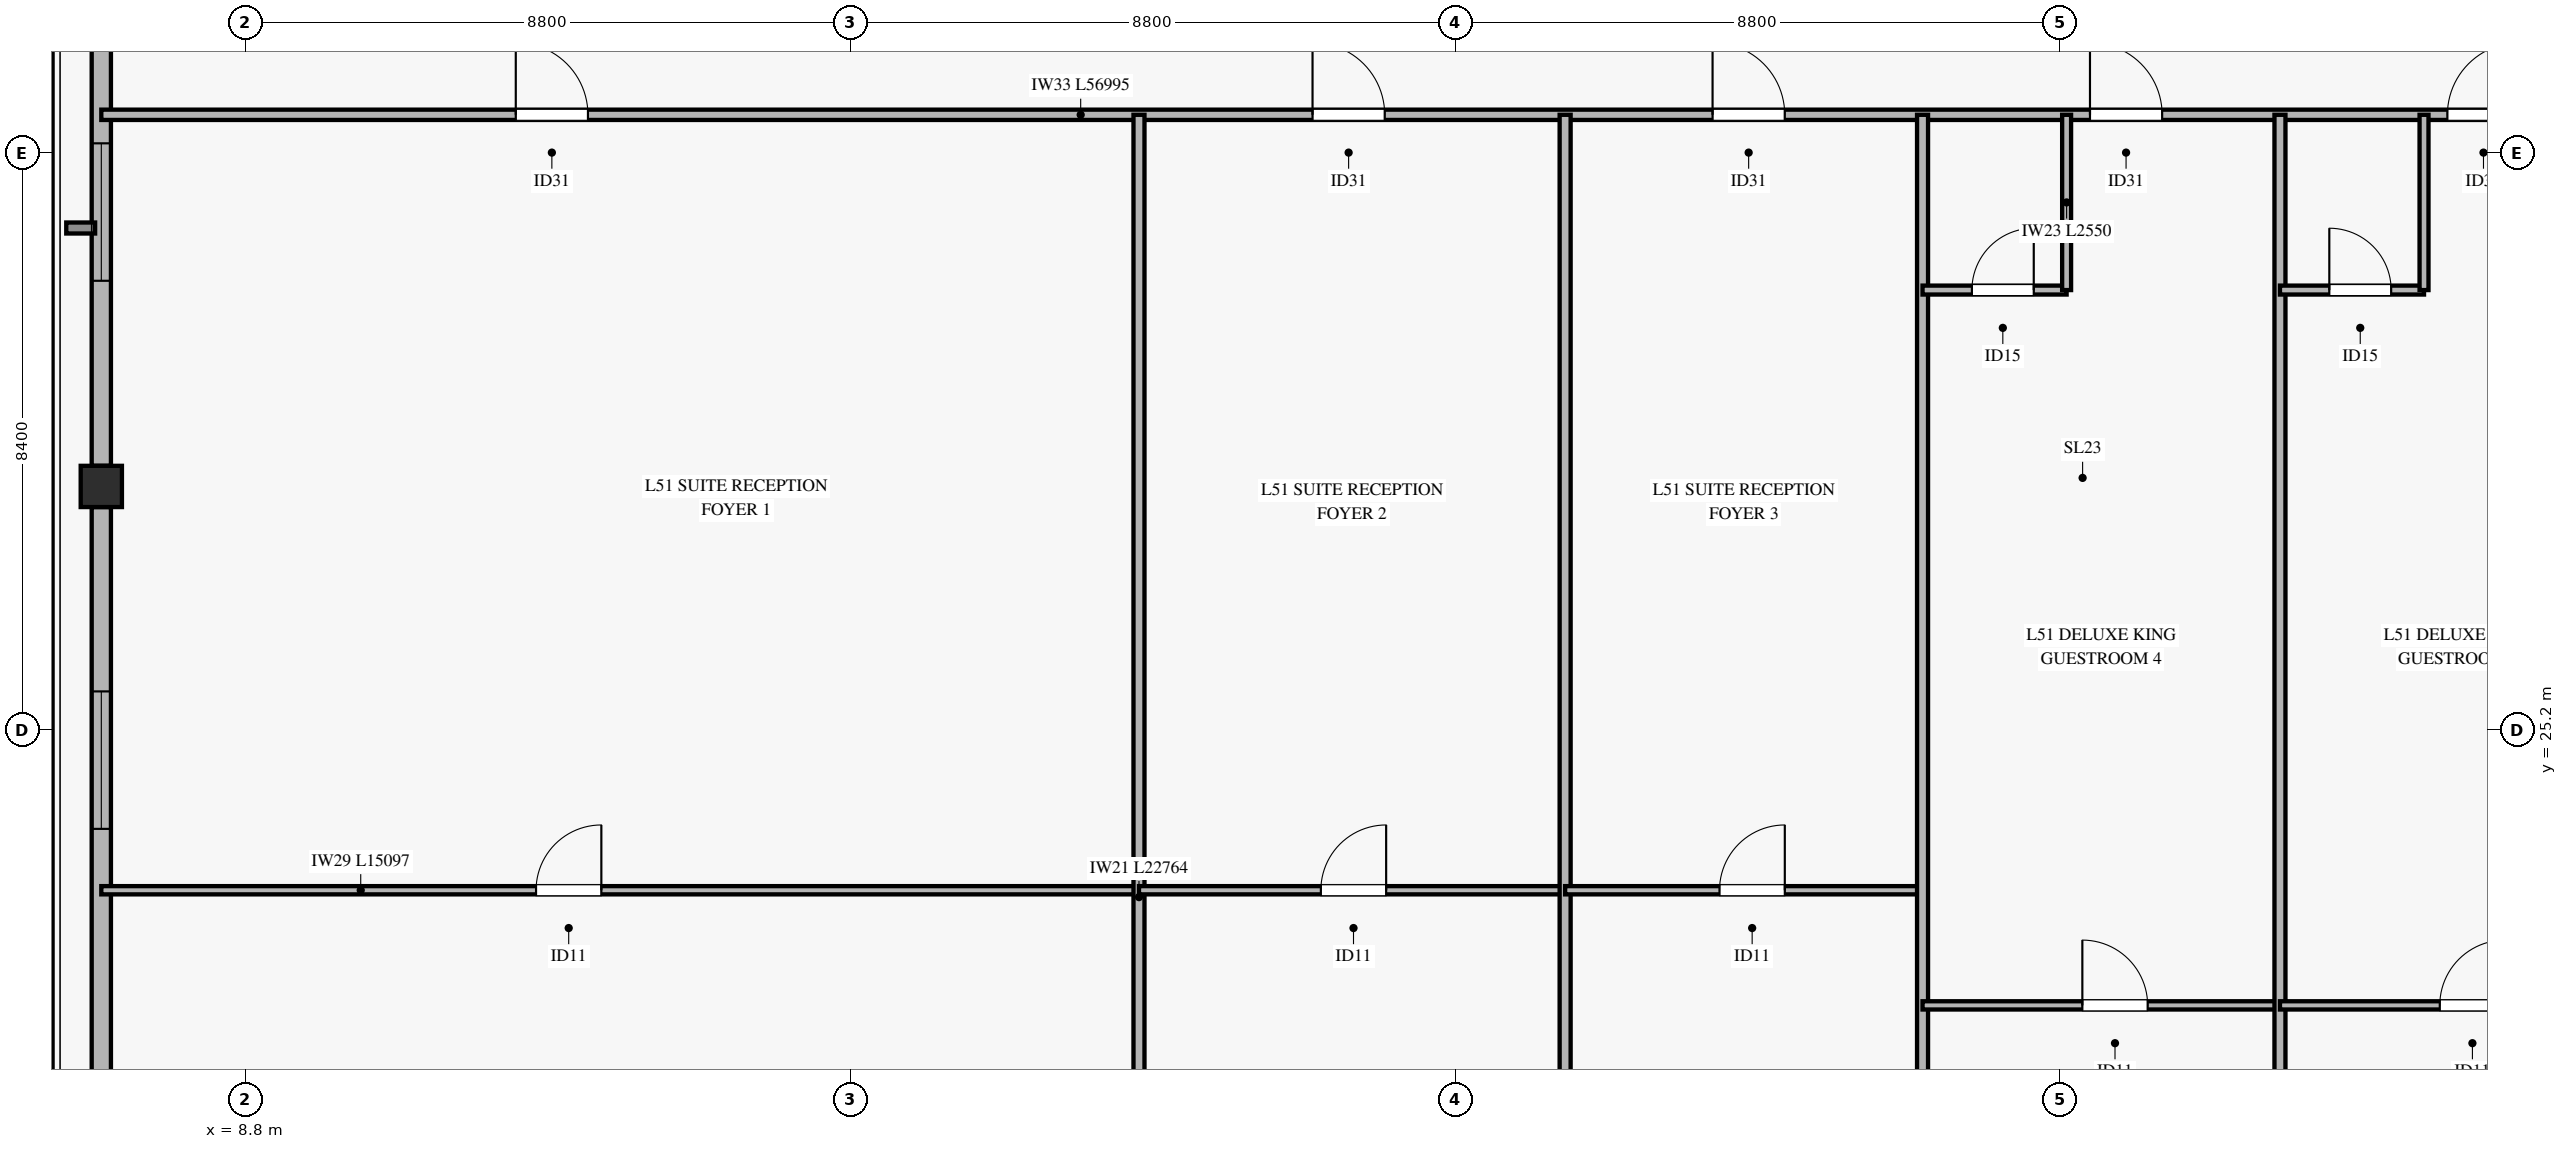
"""IFC4 building model, lengths in metres.
Left out: names, types, materials, properties, quantities, classifications, styles, units other than length and angle.
Written with IfcOpenShell. Run it as: python <this file> out.ifc"""

import sys

from ifc_helpers import new_model, si_unit, direction, frame, frame_2d, origin, origin_2d, place, context, subcontext, project, spatial, rectangle, hollow_rectangle, extrude, source, transform, mapped, element, fill, save


model = new_model("IFC4")
c1 = context("Model", 3, precision=1e-05, world=origin(), true_north=direction((0.0, 1.0)))
c2 = subcontext(c1, "Body", "Model", "MODEL_VIEW")
j1 = project(units=[si_unit("LENGTHUNIT", "METRE"), si_unit("PLANEANGLEUNIT", "RADIAN")], contexts=[c1])
p1 = place(None, origin())
s1 = spatial("IfcSite", under=j1, at=p1, CompositionType="ELEMENT")
p2 = place(p1, origin())
s2 = spatial("IfcBuilding", under=s1, at=p2, CompositionType="ELEMENT")
p3 = place(p2, frame((0.0, 0.0, 202.7)))
s3 = spatial("IfcBuildingStorey", under=s2, at=p3, CompositionType="ELEMENT", Elevation=202.7)
m1 = source(origin(), c2, "Body", "SweptSolid", [
    extrude(hollow_rectangle(XDim=0.6, YDim=0.6, WallThickness=0.028, at=origin_2d()), origin(), (0.0, 0.0, 1.0), 3.27),
])
p4 = place(p3, frame((6.703, 28.743, 0.0), z_axis=(0.0, 0.0, 1.0), x_axis=(1.0, 0.0, 0.0)))
e1 = element("IfcColumn", 1, at=p4, inside=s3, PredefinedType="COLUMN", context=c2, shape_type="MappedRepresentation", body=[
    mapped(m1, transform((0.0, 0.0, 0.0), x_axis=(1.0, 0.0, 0.0), y_axis=(0.0, 1.0, 0.0), z_axis=(0.0, 0.0, 1.0), scale=1.0)),
])
p5 = place(p3, frame((6.703, 14.186, 0.0), z_axis=(0.0, 0.0, 1.0), x_axis=(0.0, 1.0, 0.0)))
e2 = element("IfcWall", 2, at=p5, inside=s3, PredefinedType="SOLIDWALL", context=c2, shape_type="SweptSolid", body=[
    extrude(rectangle(XDim=14.257, YDim=0.28, at=frame_2d((7.128, 0.0))), origin(), (0.0, 0.0, 1.0), 2.75),
])
p6 = place(p5, frame((2.947, 0.0, 0.45)))
e3 = element("IfcOpeningElement", 3, at=p6, cuts=e2, PredefinedType="OPENING", context=c2, shape_type="SweptSolid", body=[
    extrude(rectangle(XDim=2.0, YDim=2.0, at=frame_2d((1.0, 1.0))), frame((0.0, 0.15, 0.0), z_axis=(0.0, -1.0, 0.0), x_axis=(1.0, 0.0, 0.0)), (0.0, 0.0, 1.0), 0.3),
])
p7 = place(p5, frame((9.575, 0.0, 0.45)))
e4 = element("IfcOpeningElement", 4, at=p7, cuts=e2, PredefinedType="OPENING", context=c2, shape_type="SweptSolid", body=[
    extrude(rectangle(XDim=2.0, YDim=2.0, at=frame_2d((1.0, 1.0))), frame((0.0, 0.15, 0.0), z_axis=(0.0, -1.0, 0.0), x_axis=(1.0, 0.0, 0.0)), (0.0, 0.0, 1.0), 0.3),
])
p8 = place(p3, frame((6.703, 29.043, 0.0), z_axis=(0.0, 0.0, 1.0), x_axis=(0.0, 1.0, 0.0)))
e5 = element("IfcWall", 5, at=p8, inside=s3, PredefinedType="SOLIDWALL", context=c2, shape_type="SweptSolid", body=[
    extrude(rectangle(XDim=14.257, YDim=0.28, at=frame_2d((7.128, 0.0))), origin(), (0.0, 0.0, 1.0), 2.75),
])
p9 = place(p8, frame((2.692, 0.0, 0.45)))
e6 = element("IfcOpeningElement", 6, at=p9, cuts=e5, PredefinedType="OPENING", context=c2, shape_type="SweptSolid", body=[
    extrude(rectangle(XDim=2.0, YDim=2.0, at=frame_2d((1.0, 1.0))), frame((0.0, 0.15, 0.0), z_axis=(0.0, -1.0, 0.0), x_axis=(1.0, 0.0, 0.0)), (0.0, 0.0, 1.0), 0.3),
])
p10 = place(p3, frame((6.703, 34.15, 0.0), z_axis=(0.0, 0.0, 1.0), x_axis=(1.0, 0.0, 0.0)))
e7 = element("IfcWall", 7, at=p10, inside=s3, PredefinedType="PARTITIONING", context=c2, shape_type="SweptSolid", body=[
    extrude(rectangle(XDim=56.995, YDim=0.15, at=frame_2d((28.498, 0.0))), origin(), (0.0, 0.0, 1.0), 2.455),
])
p11 = place(p10, frame((6.03, 0.0, 0.0)))
e8 = element("IfcOpeningElement", 8, at=p11, cuts=e7, PredefinedType="OPENING", context=c2, shape_type="SweptSolid", body=[
    extrude(rectangle(XDim=1.05, YDim=2.15, at=frame_2d((0.525, 1.075))), frame((0.0, 0.085, 0.0), z_axis=(0.0, -1.0, 0.0), x_axis=(1.0, 0.0, 0.0)), (0.0, 0.0, 1.0), 0.17),
])
p12 = place(p10, frame((17.622, 0.0, 0.0)))
e9 = element("IfcOpeningElement", 9, at=p12, cuts=e7, PredefinedType="OPENING", context=c2, shape_type="SweptSolid", body=[
    extrude(rectangle(XDim=1.05, YDim=2.15, at=frame_2d((0.525, 1.075))), frame((0.0, 0.085, 0.0), z_axis=(0.0, -1.0, 0.0), x_axis=(1.0, 0.0, 0.0)), (0.0, 0.0, 1.0), 0.17),
])
p13 = place(p10, frame((23.442, 0.0, 0.0)))
e10 = element("IfcOpeningElement", 10, at=p13, cuts=e7, PredefinedType="OPENING", context=c2, shape_type="SweptSolid", body=[
    extrude(rectangle(XDim=1.05, YDim=2.15, at=frame_2d((0.525, 1.075))), frame((0.0, 0.085, 0.0), z_axis=(0.0, -1.0, 0.0), x_axis=(1.0, 0.0, 0.0)), (0.0, 0.0, 1.0), 0.17),
])
p14 = place(p10, frame((28.933, 0.0, 0.0)))
e11 = element("IfcOpeningElement", 11, at=p14, cuts=e7, PredefinedType="OPENING", context=c2, shape_type="SweptSolid", body=[
    extrude(rectangle(XDim=1.05, YDim=2.15, at=frame_2d((0.525, 1.075))), frame((0.0, 0.085, 0.0), z_axis=(0.0, -1.0, 0.0), x_axis=(1.0, 0.0, 0.0)), (0.0, 0.0, 1.0), 0.17),
])
p15 = place(p10, frame((34.133, 0.0, 0.0)))
e12 = element("IfcOpeningElement", 12, at=p15, cuts=e7, PredefinedType="OPENING", context=c2, shape_type="SweptSolid", body=[
    extrude(rectangle(XDim=1.05, YDim=2.15, at=frame_2d((0.525, 1.075))), frame((0.0, 0.085, 0.0), z_axis=(0.0, -1.0, 0.0), x_axis=(1.0, 0.0, 0.0)), (0.0, 0.0, 1.0), 0.17),
])
p16 = place(p10, frame((44.627, 0.0, 0.0)))
e13 = element("IfcOpeningElement", 13, at=p16, cuts=e7, PredefinedType="OPENING", context=c2, shape_type="SweptSolid", body=[
    extrude(rectangle(XDim=1.05, YDim=2.15, at=frame_2d((0.525, 1.075))), frame((0.0, 0.085, 0.0), z_axis=(0.0, -1.0, 0.0), x_axis=(1.0, 0.0, 0.0)), (0.0, 0.0, 1.0), 0.17),
])
p17 = place(p3, frame((6.703, 22.868, 0.0), z_axis=(0.0, 0.0, 1.0), x_axis=(1.0, 0.0, 0.0)))
e14 = element("IfcWall", 14, at=p17, inside=s3, PredefinedType="PARTITIONING", context=c2, shape_type="SweptSolid", body=[
    extrude(rectangle(XDim=15.097, YDim=0.12, at=frame_2d((7.549, 0.0))), origin(), (0.0, 0.0, 1.0), 2.455),
])
p18 = place(p17, frame((6.325, 0.0, 0.0)))
e15 = element("IfcOpeningElement", 15, at=p18, cuts=e14, PredefinedType="OPENING", context=c2, shape_type="SweptSolid", body=[
    extrude(rectangle(XDim=0.95, YDim=2.1, at=frame_2d((0.475, 1.05))), frame((0.0, 0.07, 0.0), z_axis=(0.0, -1.0, 0.0), x_axis=(1.0, 0.0, 0.0)), (0.0, 0.0, 1.0), 0.14),
])
p19 = place(p3, frame((21.8, 11.386, 0.0), z_axis=(0.0, 0.0, 1.0), x_axis=(0.0, 1.0, 0.0)))
e16 = element("IfcWall", 16, at=p19, inside=s3, PredefinedType="PARTITIONING", context=c2, shape_type="SweptSolid", body=[
    extrude(rectangle(XDim=22.764, YDim=0.16, at=frame_2d((11.382, 0.0))), origin(), (0.0, 0.0, 1.0), 2.755),
])
p20 = place(p3, frame((21.8, 22.868, 0.0), z_axis=(0.0, 0.0, 1.0), x_axis=(1.0, 0.0, 0.0)))
e17 = element("IfcWall", 17, at=p20, inside=s3, PredefinedType="PARTITIONING", context=c2, shape_type="SweptSolid", body=[
    extrude(rectangle(XDim=6.2, YDim=0.12, at=frame_2d((3.1, 0.0))), origin(), (0.0, 0.0, 1.0), 3.27),
])
p21 = place(p20, frame((2.646, 0.0, 0.0)))
e18 = element("IfcOpeningElement", 18, at=p21, cuts=e17, PredefinedType="OPENING", context=c2, shape_type="SweptSolid", body=[
    extrude(rectangle(XDim=0.95, YDim=2.1, at=frame_2d((0.475, 1.05))), frame((0.0, 0.07, 0.0), z_axis=(0.0, -1.0, 0.0), x_axis=(1.0, 0.0, 0.0)), (0.0, 0.0, 1.0), 0.14),
])
p22 = place(p3, frame((28.0, 11.386, 0.0), z_axis=(0.0, 0.0, 1.0), x_axis=(0.0, 1.0, 0.0)))
e19 = element("IfcWall", 19, at=p22, inside=s3, PredefinedType="PARTITIONING", context=c2, shape_type="SweptSolid", body=[
    extrude(rectangle(XDim=22.764, YDim=0.16, at=frame_2d((11.382, 0.0))), origin(), (0.0, 0.0, 1.0), 2.755),
])
p23 = place(p3, frame((28.0, 22.868, 0.0), z_axis=(0.0, 0.0, 1.0), x_axis=(1.0, 0.0, 0.0)))
e20 = element("IfcWall", 20, at=p23, inside=s3, PredefinedType="PARTITIONING", context=c2, shape_type="SweptSolid", body=[
    extrude(rectangle(XDim=5.2, YDim=0.12, at=frame_2d((2.6, 0.0))), origin(), (0.0, 0.0, 1.0), 2.455),
])
p24 = place(p23, frame((2.246, 0.0, 0.0)))
e21 = element("IfcOpeningElement", 21, at=p24, cuts=e20, PredefinedType="OPENING", context=c2, shape_type="SweptSolid", body=[
    extrude(rectangle(XDim=0.95, YDim=2.1, at=frame_2d((0.475, 1.05))), frame((0.0, 0.07, 0.0), z_axis=(0.0, -1.0, 0.0), x_axis=(1.0, 0.0, 0.0)), (0.0, 0.0, 1.0), 0.14),
])
p25 = place(p3, frame((33.2, 11.386, 0.0), z_axis=(0.0, 0.0, 1.0), x_axis=(0.0, 1.0, 0.0)))
e22 = element("IfcWall", 22, at=p25, inside=s3, PredefinedType="PARTITIONING", context=c2, shape_type="SweptSolid", body=[
    extrude(rectangle(XDim=22.764, YDim=0.16, at=frame_2d((11.382, 0.0))), origin(), (0.0, 0.0, 1.0), 2.755),
])
p26 = place(p3, frame((33.2, 31.6, 0.0), z_axis=(0.0, 0.0, 1.0), x_axis=(1.0, 0.0, 0.0)))
e23 = element("IfcWall", 23, at=p26, inside=s3, PredefinedType="PARTITIONING", context=c2, shape_type="SweptSolid", body=[
    extrude(rectangle(XDim=2.096, YDim=0.13, at=frame_2d((1.048, 0.0))), origin(), (0.0, 0.0, 1.0), 3.27),
])
p27 = place(p26, frame((0.718, 0.0, 0.0)))
e24 = element("IfcOpeningElement", 24, at=p27, cuts=e23, PredefinedType="OPENING", context=c2, shape_type="SweptSolid", body=[
    extrude(rectangle(XDim=0.9, YDim=2.1, at=frame_2d((0.45, 1.05))), frame((0.0, 0.075, 0.0), z_axis=(0.0, -1.0, 0.0), x_axis=(1.0, 0.0, 0.0)), (0.0, 0.0, 1.0), 0.15),
])
p28 = place(p3, frame((35.296, 31.6, 0.0), z_axis=(0.0, 0.0, 1.0), x_axis=(0.0, 1.0, 0.0)))
e25 = element("IfcWall", 25, at=p28, inside=s3, PredefinedType="PARTITIONING", context=c2, shape_type="SweptSolid", body=[
    extrude(rectangle(XDim=2.55, YDim=0.13, at=frame_2d((1.275, 0.0))), origin(), (0.0, 0.0, 1.0), 2.855),
])
p29 = place(p3, frame((33.2, 21.193, 0.0), z_axis=(0.0, 0.0, 1.0), x_axis=(1.0, 0.0, 0.0)))
e26 = element("IfcWall", 26, at=p29, inside=s3, PredefinedType="PARTITIONING", context=c2, shape_type="SweptSolid", body=[
    extrude(rectangle(XDim=5.2, YDim=0.12, at=frame_2d((2.6, 0.0))), origin(), (0.0, 0.0, 1.0), 2.455),
])
p30 = place(p29, frame((2.325, 0.0, 0.0)))
e27 = element("IfcOpeningElement", 27, at=p30, cuts=e26, PredefinedType="OPENING", context=c2, shape_type="SweptSolid", body=[
    extrude(rectangle(XDim=0.95, YDim=2.1, at=frame_2d((0.475, 1.05))), frame((0.0, 0.07, 0.0), z_axis=(0.0, -1.0, 0.0), x_axis=(1.0, 0.0, 0.0)), (0.0, 0.0, 1.0), 0.14),
])
p31 = place(p3, frame((38.4, 11.386, 0.0), z_axis=(0.0, 0.0, 1.0), x_axis=(0.0, 1.0, 0.0)))
e28 = element("IfcWall", 28, at=p31, inside=s3, PredefinedType="PARTITIONING", context=c2, shape_type="SweptSolid", body=[
    extrude(rectangle(XDim=22.764, YDim=0.16, at=frame_2d((11.382, 0.0))), origin(), (0.0, 0.0, 1.0), 2.755),
])
p32 = place(p3, frame((38.4, 31.6, 0.0), z_axis=(0.0, 0.0, 1.0), x_axis=(1.0, 0.0, 0.0)))
e29 = element("IfcWall", 29, at=p32, inside=s3, PredefinedType="PARTITIONING", context=c2, shape_type="SweptSolid", body=[
    extrude(rectangle(XDim=2.096, YDim=0.13, at=frame_2d((1.048, 0.0))), origin(), (0.0, 0.0, 1.0), 3.27),
])
p33 = place(p32, frame((0.718, 0.0, 0.0)))
e30 = element("IfcOpeningElement", 30, at=p33, cuts=e29, PredefinedType="OPENING", context=c2, shape_type="SweptSolid", body=[
    extrude(rectangle(XDim=0.9, YDim=2.1, at=frame_2d((0.45, 1.05))), frame((0.0, 0.075, 0.0), z_axis=(0.0, -1.0, 0.0), x_axis=(1.0, 0.0, 0.0)), (0.0, 0.0, 1.0), 0.15),
])
p34 = place(p3, frame((40.496, 31.6, 0.0), z_axis=(0.0, 0.0, 1.0), x_axis=(0.0, 1.0, 0.0)))
e31 = element("IfcWall", 31, at=p34, inside=s3, PredefinedType="PARTITIONING", context=c2, shape_type="SweptSolid", body=[
    extrude(rectangle(XDim=2.55, YDim=0.13, at=frame_2d((1.275, 0.0))), origin(), (0.0, 0.0, 1.0), 2.855),
])
p35 = place(p3, frame((38.4, 21.193, 0.0), z_axis=(0.0, 0.0, 1.0), x_axis=(1.0, 0.0, 0.0)))
e32 = element("IfcWall", 32, at=p35, inside=s3, PredefinedType="PARTITIONING", context=c2, shape_type="SweptSolid", body=[
    extrude(rectangle(XDim=5.2, YDim=0.12, at=frame_2d((2.6, 0.0))), origin(), (0.0, 0.0, 1.0), 3.27),
])
p36 = place(p35, frame((2.325, 0.0, 0.0)))
e33 = element("IfcOpeningElement", 33, at=p36, cuts=e32, PredefinedType="OPENING", context=c2, shape_type="SweptSolid", body=[
    extrude(rectangle(XDim=0.95, YDim=2.1, at=frame_2d((0.475, 1.05))), frame((0.0, 0.07, 0.0), z_axis=(0.0, -1.0, 0.0), x_axis=(1.0, 0.0, 0.0)), (0.0, 0.0, 1.0), 0.14),
])
m2 = source(origin(), c2, "Body", "SweptSolid", [
    extrude(rectangle(XDim=2.0, YDim=2.0, at=frame_2d((1.0, 1.0))), frame((0.0, 0.03, 0.0), z_axis=(0.0, -1.0, 0.0), x_axis=(1.0, 0.0, 0.0)), (0.0, 0.0, 1.0), 0.06),
])
p37 = place(p7, origin())
e34 = element("IfcWindow", 34, at=p37, inside=s3, PartitioningType="SINGLE_PANEL", PredefinedType="WINDOW", context=c2, shape_type="MappedRepresentation", body=[
    mapped(m2, transform((0.0, 0.0, 0.0), x_axis=(1.0, 0.0, 0.0), y_axis=(0.0, 1.0, 0.0), z_axis=(0.0, 0.0, 1.0), scale=1.0)),
])
fill(e4, e34)
p38 = place(p9, origin())
e35 = element("IfcWindow", 35, at=p38, inside=s3, PartitioningType="SINGLE_PANEL", PredefinedType="WINDOW", context=c2, shape_type="MappedRepresentation", body=[
    mapped(m2, transform((0.0, 0.0, 0.0), x_axis=(1.0, 0.0, 0.0), y_axis=(0.0, 1.0, 0.0), z_axis=(0.0, 0.0, 1.0), scale=1.0)),
])
fill(e6, e35)
m3 = source(origin(), c2, "Body", "SweptSolid", [
    extrude(rectangle(XDim=1.05, YDim=2.15, at=frame_2d((0.525, 1.075))), frame((0.0, 0.025, 0.0), z_axis=(0.0, -1.0, 0.0), x_axis=(1.0, 0.0, 0.0)), (0.0, 0.0, 1.0), 0.05),
])
p39 = place(p11, origin())
e36 = element("IfcDoor", 36, at=p39, inside=s3, OperationType="SINGLE_SWING_LEFT", PredefinedType="DOOR", context=c2, shape_type="MappedRepresentation", body=[
    mapped(m3, transform((0.0, 0.0, 0.0), x_axis=(1.0, 0.0, 0.0), y_axis=(0.0, 1.0, 0.0), z_axis=(0.0, 0.0, 1.0), scale=1.0)),
])
fill(e8, e36)
m4 = source(origin(), c2, "Body", "SweptSolid", [
    extrude(rectangle(XDim=0.95, YDim=2.1, at=frame_2d((0.475, 1.05))), frame((0.0, 0.025, 0.0), z_axis=(0.0, -1.0, 0.0), x_axis=(1.0, 0.0, 0.0)), (0.0, 0.0, 1.0), 0.05),
])
p40 = place(p18, origin())
e37 = element("IfcDoor", 37, at=p40, inside=s3, OperationType="SINGLE_SWING_RIGHT", PredefinedType="DOOR", context=c2, shape_type="MappedRepresentation", body=[
    mapped(m4, transform((0.0, 0.0, 0.0), x_axis=(1.0, 0.0, 0.0), y_axis=(0.0, 1.0, 0.0), z_axis=(0.0, 0.0, 1.0), scale=1.0)),
])
fill(e15, e37)
p41 = place(p12, origin())
e38 = element("IfcDoor", 38, at=p41, inside=s3, OperationType="SINGLE_SWING_LEFT", PredefinedType="DOOR", context=c2, shape_type="MappedRepresentation", body=[
    mapped(m3, transform((0.0, 0.0, 0.0), x_axis=(1.0, 0.0, 0.0), y_axis=(0.0, 1.0, 0.0), z_axis=(0.0, 0.0, 1.0), scale=1.0)),
])
fill(e9, e38)
p42 = place(p21, origin())
e39 = element("IfcDoor", 39, at=p42, inside=s3, OperationType="SINGLE_SWING_RIGHT", PredefinedType="DOOR", context=c2, shape_type="MappedRepresentation", body=[
    mapped(m4, transform((0.0, 0.0, 0.0), x_axis=(1.0, 0.0, 0.0), y_axis=(0.0, 1.0, 0.0), z_axis=(0.0, 0.0, 1.0), scale=1.0)),
])
fill(e18, e39)
p43 = place(p13, origin())
e40 = element("IfcDoor", 40, at=p43, inside=s3, OperationType="SINGLE_SWING_LEFT", PredefinedType="DOOR", context=c2, shape_type="MappedRepresentation", body=[
    mapped(m3, transform((0.0, 0.0, 0.0), x_axis=(1.0, 0.0, 0.0), y_axis=(0.0, 1.0, 0.0), z_axis=(0.0, 0.0, 1.0), scale=1.0)),
])
fill(e10, e40)
p44 = place(p24, origin())
e41 = element("IfcDoor", 41, at=p44, inside=s3, OperationType="SINGLE_SWING_RIGHT", PredefinedType="DOOR", context=c2, shape_type="MappedRepresentation", body=[
    mapped(m4, transform((0.0, 0.0, 0.0), x_axis=(1.0, 0.0, 0.0), y_axis=(0.0, 1.0, 0.0), z_axis=(0.0, 0.0, 1.0), scale=1.0)),
])
fill(e21, e41)
p45 = place(p14, origin())
e42 = element("IfcDoor", 42, at=p45, inside=s3, OperationType="SINGLE_SWING_LEFT", PredefinedType="DOOR", context=c2, shape_type="MappedRepresentation", body=[
    mapped(m3, transform((0.0, 0.0, 0.0), x_axis=(1.0, 0.0, 0.0), y_axis=(0.0, 1.0, 0.0), z_axis=(0.0, 0.0, 1.0), scale=1.0)),
])
fill(e11, e42)
m5 = source(origin(), c2, "Body", "SweptSolid", [
    extrude(rectangle(XDim=0.9, YDim=2.1, at=frame_2d((0.45, 1.05))), frame((0.0, 0.025, 0.0), z_axis=(0.0, -1.0, 0.0), x_axis=(1.0, 0.0, 0.0)), (0.0, 0.0, 1.0), 0.05),
])
p46 = place(p27, origin())
e43 = element("IfcDoor", 43, at=p46, inside=s3, OperationType="SINGLE_SWING_RIGHT", PredefinedType="DOOR", context=c2, shape_type="MappedRepresentation", body=[
    mapped(m5, transform((0.0, 0.0, 0.0), x_axis=(1.0, 0.0, 0.0), y_axis=(0.0, 1.0, 0.0), z_axis=(0.0, 0.0, 1.0), scale=1.0)),
])
fill(e24, e43)
p47 = place(p30, origin())
e44 = element("IfcDoor", 44, at=p47, inside=s3, OperationType="SINGLE_SWING_LEFT", PredefinedType="DOOR", context=c2, shape_type="MappedRepresentation", body=[
    mapped(m4, transform((0.0, 0.0, 0.0), x_axis=(1.0, 0.0, 0.0), y_axis=(0.0, 1.0, 0.0), z_axis=(0.0, 0.0, 1.0), scale=1.0)),
])
fill(e27, e44)
p48 = place(p15, origin())
e45 = element("IfcDoor", 45, at=p48, inside=s3, OperationType="SINGLE_SWING_RIGHT", PredefinedType="DOOR", context=c2, shape_type="MappedRepresentation", body=[
    mapped(m3, transform((0.0, 0.0, 0.0), x_axis=(1.0, 0.0, 0.0), y_axis=(0.0, 1.0, 0.0), z_axis=(0.0, 0.0, 1.0), scale=1.0)),
])
fill(e12, e45)
p49 = place(p33, origin())
e46 = element("IfcDoor", 46, at=p49, inside=s3, OperationType="SINGLE_SWING_LEFT", PredefinedType="DOOR", context=c2, shape_type="MappedRepresentation", body=[
    mapped(m5, transform((0.0, 0.0, 0.0), x_axis=(1.0, 0.0, 0.0), y_axis=(0.0, 1.0, 0.0), z_axis=(0.0, 0.0, 1.0), scale=1.0)),
])
fill(e30, e46)
p50 = place(p36, origin())
e47 = element("IfcDoor", 47, at=p50, inside=s3, OperationType="SINGLE_SWING_RIGHT", PredefinedType="DOOR", context=c2, shape_type="MappedRepresentation", body=[
    mapped(m4, transform((0.0, 0.0, 0.0), x_axis=(1.0, 0.0, 0.0), y_axis=(0.0, 1.0, 0.0), z_axis=(0.0, 0.0, 1.0), scale=1.0)),
])
fill(e33, e47)
save(model, sys.argv[1])
